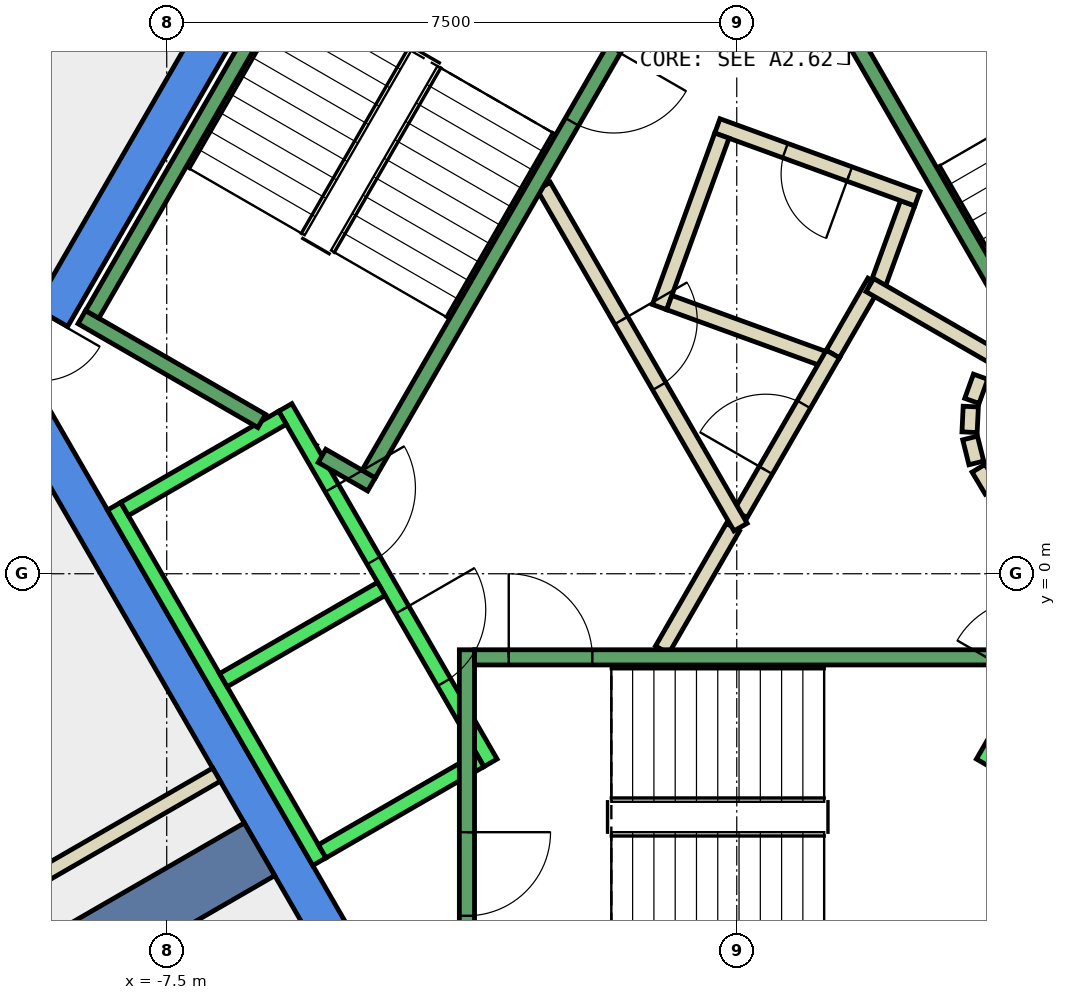
"""IFC4 building model, lengths in metres.
Left out: names, types, materials, properties, quantities, classifications, styles, units other than length and angle.
Written with IfcOpenShell. Run it as: python <this file> out.ifc"""

import sys

from ifc_helpers import new_model, si_unit, direction, frame, frame_2d, origin, place, context, subcontext, project, spatial, polyline, rectangle, outline, extrude, element, fill, save


model = new_model("IFC4")
c1 = context("Model", 3, precision=1e-05, world=origin(), true_north=direction((0.0, 1.0)))
c2 = subcontext(c1, "Body", "Model", "MODEL_VIEW")
j1 = project(units=[si_unit("LENGTHUNIT", "METRE"), si_unit("PLANEANGLEUNIT", "RADIAN")], contexts=[c1])
p1 = place(None, origin())
s1 = spatial("IfcSite", under=j1, at=p1, CompositionType="ELEMENT")
p2 = place(p1, origin())
s2 = spatial("IfcBuilding", under=s1, at=p2, CompositionType="ELEMENT")
p3 = place(p2, frame((0.0, 0.0, 290.0)))
s3 = spatial("IfcBuildingStorey", under=s2, at=p3, CompositionType="ELEMENT", Elevation=290.0)
p4 = place(p3, frame((0.0, 0.0, -0.34)))
e1 = element("IfcWall", 1, at=p4, inside=s3, PredefinedType="SHEAR", context=c2, shape_type="SweptSolid", body=[
    extrude(outline(polyline([(-9.236, 3.502), (-8.803, 3.253), (-4.619, 10.5), (-4.907, 11.0), (-9.236, 3.502)])), origin(), (0.0, 0.0, 1.0), 3.6),
])
p5 = place(p3, frame((0.0, 0.0, -0.34)))
e2 = element("IfcWall", 2, at=p5, inside=s3, PredefinedType="SHEAR", context=c2, shape_type="SweptSolid", body=[
    extrude(outline(polyline([(-9.815, 2.5), (-4.907, -6.0), (-4.619, -5.5), (-9.238, 2.5), (-9.815, 2.5)])), origin(), (0.0, 0.0, 1.0), 3.6),
])
p6 = place(p3, frame((-6.279, -3.625, -0.34), z_axis=(0.0, 0.0, 1.0), x_axis=(-0.866017533419, -0.500013631625, 0.0)))
e3 = element("IfcWall", 3, at=p6, inside=s3, PredefinedType="SHEAR", context=c2, shape_type="SweptSolid", body=[
    extrude(rectangle(XDim=9.0, YDim=0.8, at=frame_2d((4.5, 0.0))), origin(), (0.0, 0.0, 1.0), 3.6),
])
p7 = place(p3, frame((1.264, 2.89, 0.0), z_axis=(0.0, 0.0, 1.0), x_axis=(0.500043792738, 0.866000118559, 0.0)))
e4 = element("IfcWall", 4, at=p7, inside=s3, PredefinedType="PARTITIONING", context=c2, shape_type="SweptSolid", body=[
    extrude(rectangle(XDim=1.096, YDim=0.2, at=frame_2d((0.548, 0.0))), origin(), (0.0, 0.0, 1.0), 3.26),
])
p8 = place(p3, frame((1.838, 3.748, 0.0), z_axis=(0.0, 0.0, 1.0), x_axis=(0.342266462435, 0.939602931398, 0.0)))
e5 = element("IfcWall", 5, at=p8, inside=s3, PredefinedType="PARTITIONING", context=c2, shape_type="SweptSolid", body=[
    extrude(rectangle(XDim=1.198, YDim=0.2, at=frame_2d((0.599, 0.0))), origin(), (0.0, 0.0, 1.0), 3.26),
])
p9 = place(p3, frame((2.376, 4.934, 0.0), z_axis=(0.0, 0.0, 1.0), x_axis=(-0.939640574808, 0.342163104635, 0.0)))
e6 = element("IfcWall", 6, at=p9, inside=s3, PredefinedType="PARTITIONING", context=c2, shape_type="SweptSolid", body=[
    extrude(rectangle(XDim=2.8, YDim=0.2, at=frame_2d((1.4, 0.0))), origin(), (0.0, 0.0, 1.0), 3.26),
])
p10 = place(p9, frame((0.95, 0.0, 0.0)))
e7 = element("IfcOpeningElement", 7, at=p10, cuts=e6, PredefinedType="OPENING", context=c2, shape_type="SweptSolid", body=[
    extrude(rectangle(XDim=0.9, YDim=2.1, at=frame_2d((0.45, 1.05))), frame((0.0, 0.11, 0.0), z_axis=(0.0, -1.0, 0.0), x_axis=(1.0, 0.0, 0.0)), (0.0, 0.0, 1.0), 0.22),
])
p11 = place(p3, frame((-0.196, 5.764, 0.0), z_axis=(0.0, 0.0, 1.0), x_axis=(-0.34165322761, -0.939826086073, 0.0)))
e8 = element("IfcWall", 8, at=p11, inside=s3, PredefinedType="PARTITIONING", context=c2, shape_type="SweptSolid", body=[
    extrude(rectangle(XDim=2.4, YDim=0.2, at=frame_2d((1.2, 0.0))), origin(), (0.0, 0.0, 1.0), 3.26),
])
p12 = place(p3, frame((-0.888, 3.568, 0.0), z_axis=(0.0, 0.0, 1.0), x_axis=(0.939685034098, -0.34204098686, 0.0)))
e9 = element("IfcWall", 9, at=p12, inside=s3, PredefinedType="PARTITIONING", context=c2, shape_type="SweptSolid", body=[
    extrude(rectangle(XDim=2.237, YDim=0.2, at=frame_2d((1.119, 0.0))), origin(), (0.0, 0.0, 1.0), 3.26),
])
p13 = place(p3, frame((-0.982, -1.0, 0.0), z_axis=(0.0, 0.0, 1.0), x_axis=(0.50024047865, 0.865886518847, 0.0)))
e10 = element("IfcWall", 10, at=p13, inside=s3, PredefinedType="PARTITIONING", context=c2, shape_type="SweptSolid", body=[
    extrude(rectangle(XDim=1.863, YDim=0.2, at=frame_2d((0.931, 0.0))), origin(), (0.0, 0.0, 1.0), 3.26),
])
p14 = place(p3, frame((0.05, 0.787, 0.0), z_axis=(0.0, 0.0, 1.0), x_axis=(0.499945861543, 0.866056658381, 0.0)))
e11 = element("IfcWall", 11, at=p14, inside=s3, PredefinedType="PARTITIONING", context=c2, shape_type="SweptSolid", body=[
    extrude(rectangle(XDim=2.428, YDim=0.2, at=frame_2d((1.214, 0.0))), origin(), (0.0, 0.0, 1.0), 3.26),
])
p15 = place(p14, frame((0.664, 0.0, 0.0)))
e12 = element("IfcOpeningElement", 12, at=p15, cuts=e11, PredefinedType="OPENING", context=c2, shape_type="SweptSolid", body=[
    extrude(rectangle(XDim=1.0, YDim=2.1, at=frame_2d((0.5, 1.05))), frame((0.0, 0.11, 0.0), z_axis=(0.0, -1.0, 0.0), x_axis=(1.0, 0.0, 0.0)), (0.0, 0.0, 1.0), 0.22),
])
p16 = place(p3, frame((1.751, 3.798, 0.0), z_axis=(0.0, 0.0, 1.0), x_axis=(0.866091650241, -0.499885240213, 0.0)))
e13 = element("IfcWall", 13, at=p16, inside=s3, PredefinedType="PARTITIONING", context=c2, shape_type="SweptSolid", body=[
    extrude(rectangle(XDim=1.991, YDim=0.2, at=frame_2d((0.995, 0.0))), origin(), (0.0, 0.0, 1.0), 3.26),
])
p17 = place(p3, frame((3.208, 2.592, 0.0), z_axis=(0.0, 0.0, 1.0), x_axis=(-0.337388820924, -0.941365382578, 0.0)))
e14 = element("IfcWall", 14, at=p17, inside=s3, PredefinedType="PARTITIONING", context=c2, shape_type="SweptSolid", body=[
    extrude(rectangle(XDim=0.338, YDim=0.2, at=frame_2d((0.169, 0.0))), origin(), (0.0, 0.0, 1.0), 3.26),
])
p18 = place(p3, frame((3.079, 2.199, 0.0), z_axis=(0.0, 0.0, 1.0), x_axis=(-0.047771483479, -0.998858290933, 0.0)))
e15 = element("IfcWall", 15, at=p18, inside=s3, PredefinedType="PARTITIONING", context=c2, shape_type="SweptSolid", body=[
    extrude(rectangle(XDim=0.337, YDim=0.2, at=frame_2d((0.169, 0.0))), origin(), (0.0, 0.0, 1.0), 3.26),
])
p19 = place(p3, frame((3.07, 1.786, 0.0), z_axis=(0.0, 0.0, 1.0), x_axis=(0.242705583207, -0.970099994784, 0.0)))
e16 = element("IfcWall", 16, at=p19, inside=s3, PredefinedType="PARTITIONING", context=c2, shape_type="SweptSolid", body=[
    extrude(rectangle(XDim=0.338, YDim=0.2, at=frame_2d((0.169, 0.0))), origin(), (0.0, 0.0, 1.0), 3.26),
])
p20 = place(p3, frame((3.182, 1.388, 0.0), z_axis=(0.0, 0.0, 1.0), x_axis=(0.512474702713, -0.85870232274, 0.0)))
e17 = element("IfcWall", 17, at=p20, inside=s3, PredefinedType="PARTITIONING", context=c2, shape_type="SweptSolid", body=[
    extrude(rectangle(XDim=0.338, YDim=0.2, at=frame_2d((0.169, 0.0))), origin(), (0.0, 0.0, 1.0), 3.26),
])
p21 = place(p3, frame((-2.54, 5.1, 0.0), z_axis=(0.0, 0.0, 1.0), x_axis=(0.499925051871, -0.866068670783, 0.0)))
e18 = element("IfcWall", 18, at=p21, inside=s3, PredefinedType="PARTITIONING", context=c2, shape_type="SweptSolid", body=[
    extrude(rectangle(XDim=5.181, YDim=0.2, at=frame_2d((2.59, 0.0))), origin(), (0.0, 0.0, 1.0), 3.26),
])
p22 = place(p21, frame((2.04, 0.0, 0.0)))
e19 = element("IfcOpeningElement", 19, at=p22, cuts=e18, PredefinedType="OPENING", context=c2, shape_type="SweptSolid", body=[
    extrude(rectangle(XDim=1.0, YDim=2.1, at=frame_2d((0.5, 1.05))), frame((0.0, 0.11, 0.0), z_axis=(0.0, -1.0, 0.0), x_axis=(1.0, 0.0, 0.0)), (0.0, 0.0, 1.0), 0.22),
])
p23 = place(p3, frame((-6.845, -2.643, 0.0), z_axis=(0.0, 0.0, 1.0), x_axis=(-0.865994457699, -0.500053596362, 0.0)))
e20 = element("IfcWall", 20, at=p23, inside=s3, PredefinedType="PARTITIONING", context=c2, shape_type="SweptSolid", body=[
    extrude(rectangle(XDim=6.701, YDim=0.2, at=frame_2d((3.351, 0.0))), origin(), (0.0, 0.0, 1.0), 3.26),
])
p24 = place(p3, frame((-5.94, 2.188, 0.0), z_axis=(0.0, 0.0, 1.0), x_axis=(0.500034260056, -0.866005622828, 0.0)))
e21 = element("IfcWall", 21, at=p24, inside=s3, PredefinedType="STANDARD", context=c2, shape_type="SweptSolid", body=[
    extrude(rectangle(XDim=5.399, YDim=0.2, at=frame_2d((2.7, 0.0))), origin(), (0.0, 0.0, 1.0), 3.26),
])
p25 = place(p24, frame((3.075, 0.0, 0.0)))
e22 = element("IfcOpeningElement", 22, at=p25, cuts=e21, PredefinedType="OPENING", context=c2, shape_type="SweptSolid", body=[
    extrude(rectangle(XDim=1.1, YDim=2.1, at=frame_2d((0.55, 1.05))), frame((0.0, 0.11, 0.0), z_axis=(0.0, -1.0, 0.0), x_axis=(1.0, 0.0, 0.0)), (0.0, 0.0, 1.0), 0.22),
])
p26 = place(p24, frame((1.225, 0.0, 0.0)))
e23 = element("IfcOpeningElement", 23, at=p26, cuts=e21, PredefinedType="OPENING", context=c2, shape_type="SweptSolid", body=[
    extrude(rectangle(XDim=1.1, YDim=2.1, at=frame_2d((0.55, 1.05))), frame((0.0, 0.11, 0.0), z_axis=(0.0, -1.0, 0.0), x_axis=(1.0, 0.0, 0.0)), (0.0, 0.0, 1.0), 0.22),
])
p27 = place(p3, frame((-8.192, 0.888, 0.0), z_axis=(0.0, 0.0, 1.0), x_axis=(0.500034260056, -0.866005622828, 0.0)))
e24 = element("IfcWall", 24, at=p27, inside=s3, PredefinedType="STANDARD", context=c2, shape_type="SweptSolid", body=[
    extrude(rectangle(XDim=5.399, YDim=0.2, at=frame_2d((2.7, 0.0))), origin(), (0.0, 0.0, 1.0), 3.26),
])
for number, where, z_axis, x_axis in (
    (25, (-5.977, 2.052, 0.0), (0.0, 0.0, 1.0), (-0.866, -0.5, 0.0)),
    (26, (-4.677, -0.2, 0.0), (0.0, 0.0, 1.0), (-0.866, -0.5, 0.0)),
):
    element("IfcWall", number, at=place(p3, frame(where, z_axis=z_axis, x_axis=x_axis)), inside=s3, PredefinedType="STANDARD", context=c2, shape_type="SweptSolid", body=[
        extrude(rectangle(XDim=2.399, YDim=0.2, at=frame_2d((1.2, 0.0))), origin(), (0.0, 0.0, 1.0), 3.26),
    ])
p28 = place(p3, frame((-3.377, -2.452, 0.0), z_axis=(0.0, 0.0, 1.0), x_axis=(-0.865955154139, -0.50012165622, 0.0)))
e27 = element("IfcWall", 27, at=p28, inside=s3, PredefinedType="STANDARD", context=c2, shape_type="SweptSolid", body=[
    extrude(rectangle(XDim=2.4, YDim=0.2, at=frame_2d((1.2, 0.0))), origin(), (0.0, 0.0, 1.0), 3.26),
])
p29 = place(p3, frame((3.24, -2.488, 0.0), z_axis=(0.0, 0.0, 1.0), x_axis=(0.500034260056, 0.866005622828, 0.0)))
e28 = element("IfcWall", 28, at=p29, inside=s3, PredefinedType="STANDARD", context=c2, shape_type="SweptSolid", body=[
    extrude(rectangle(XDim=5.399, YDim=0.2, at=frame_2d((2.7, 0.0))), origin(), (0.0, 0.0, 1.0), 3.26),
])
p30 = place(p29, frame((3.225, 0.0, 0.0)))
e29 = element("IfcOpeningElement", 29, at=p30, cuts=e28, PredefinedType="OPENING", context=c2, shape_type="SweptSolid", body=[
    extrude(rectangle(XDim=1.1, YDim=2.1, at=frame_2d((0.55, 1.05))), frame((0.0, 0.11, 0.0), z_axis=(0.0, -1.0, 0.0), x_axis=(1.0, 0.0, 0.0)), (0.0, 0.0, 1.0), 0.22),
])
p31 = place(p29, frame((1.225, 0.0, 0.0)))
e30 = element("IfcOpeningElement", 30, at=p31, cuts=e28, PredefinedType="OPENING", context=c2, shape_type="SweptSolid", body=[
    extrude(rectangle(XDim=1.1, YDim=2.1, at=frame_2d((0.55, 1.05))), frame((0.0, 0.11, 0.0), z_axis=(0.0, -1.0, 0.0), x_axis=(1.0, 0.0, 0.0)), (0.0, 0.0, 1.0), 0.22),
])
p32 = place(p3, frame((-3.55, -1.0, 0.0), z_axis=(0.0, 0.0, 1.0), x_axis=(0.0, -1.0, 0.0)))
e31 = element("IfcWall", 31, at=p32, inside=s3, PredefinedType="STANDARD", context=c2, shape_type="SweptSolid", body=[
    extrude(rectangle(XDim=4.4, YDim=0.2, at=frame_2d((2.2, 0.0))), origin(), (0.0, 0.0, 1.0), 3.26),
])
p33 = place(p32, frame((2.4, 0.0, 0.0)))
e32 = element("IfcOpeningElement", 32, at=p33, cuts=e31, PredefinedType="OPENING", context=c2, shape_type="SweptSolid", body=[
    extrude(rectangle(XDim=1.1, YDim=2.2, at=frame_2d((0.55, 1.1))), frame((0.0, 0.11, 0.0), z_axis=(0.0, -1.0, 0.0), x_axis=(1.0, 0.0, 0.0)), (0.0, 0.0, 1.0), 0.22),
])
p34 = place(p3, frame((-3.45, -1.1, 0.0), z_axis=(0.0, 0.0, 1.0), x_axis=(1.0, 0.0, 0.0)))
e33 = element("IfcWall", 33, at=p34, inside=s3, PredefinedType="STANDARD", context=c2, shape_type="SweptSolid", body=[
    extrude(rectangle(XDim=6.9, YDim=0.2, at=frame_2d((3.45, 0.0))), origin(), (0.0, 0.0, 1.0), 3.26),
])
p35 = place(p34, frame((0.45, 0.0, 0.0)))
e34 = element("IfcOpeningElement", 34, at=p35, cuts=e33, PredefinedType="OPENING", context=c2, shape_type="SweptSolid", body=[
    extrude(rectangle(XDim=1.1, YDim=2.2, at=frame_2d((0.55, 1.1))), frame((0.0, 0.11, 0.0), z_axis=(0.0, -1.0, 0.0), x_axis=(1.0, 0.0, 0.0)), (0.0, 0.0, 1.0), 0.22),
])
p36 = place(p3, frame((4.843, 1.312, 0.0), z_axis=(0.0, 0.0, 1.0), x_axis=(-0.499963383562, 0.866046543262, 0.0)))
e35 = element("IfcWall", 35, at=p36, inside=s3, PredefinedType="STANDARD", context=c2, shape_type="SweptSolid", body=[
    extrude(rectangle(XDim=6.9, YDim=0.2, at=frame_2d((3.45, 0.0))), origin(), (0.0, 0.0, 1.0), 3.26),
])
p37 = place(p36, frame((0.45, 0.0, 0.0)))
e36 = element("IfcOpeningElement", 36, at=p37, cuts=e35, PredefinedType="OPENING", context=c2, shape_type="SweptSolid", body=[
    extrude(rectangle(XDim=1.1, YDim=2.2, at=frame_2d((0.55, 1.1))), frame((0.0, 0.11, 0.0), z_axis=(0.0, -1.0, 0.0), x_axis=(1.0, 0.0, 0.0)), (0.0, 0.0, 1.0), 0.22),
])
p38 = place(p3, frame((-6.25, 2.01, 0.0), z_axis=(0.0, 0.0, 1.0), x_axis=(-0.86611865017, 0.499838457731, 0.0)))
e37 = element("IfcWall", 37, at=p38, inside=s3, PredefinedType="STANDARD", context=c2, shape_type="SweptSolid", body=[
    extrude(rectangle(XDim=2.733, YDim=0.2, at=frame_2d((1.366, 0.0))), origin(), (0.0, 0.0, 1.0), 3.26),
])
p39 = place(p3, frame((-4.806, 1.176, 0.0), z_axis=(0.0, 0.0, 1.0), x_axis=(-0.866558586415, 0.499075361355, 0.0)))
e38 = element("IfcWall", 38, at=p39, inside=s3, PredefinedType="STANDARD", context=c2, shape_type="SweptSolid", body=[
    extrude(rectangle(XDim=0.751, YDim=0.2, at=frame_2d((0.376, 0.0))), origin(), (0.0, 0.0, 1.0), 3.26),
])
p40 = place(p3, frame((-1.393, 7.288, 0.0), z_axis=(0.0, 0.0, 1.0), x_axis=(-0.499963383562, -0.866046543262, 0.0)))
e39 = element("IfcWall", 39, at=p40, inside=s3, PredefinedType="STANDARD", context=c2, shape_type="SweptSolid", body=[
    extrude(rectangle(XDim=6.9, YDim=0.2, at=frame_2d((3.45, 0.0))), origin(), (0.0, 0.0, 1.0), 3.26),
])
p41 = place(p40, frame((0.45, 0.0, 0.0)))
e40 = element("IfcOpeningElement", 40, at=p41, cuts=e39, PredefinedType="OPENING", context=c2, shape_type="SweptSolid", body=[
    extrude(rectangle(XDim=1.1, YDim=2.2, at=frame_2d((0.55, 1.1))), frame((0.0, 0.11, 0.0), z_axis=(0.0, -1.0, 0.0), x_axis=(1.0, 0.0, 0.0)), (0.0, 0.0, 1.0), 0.22),
])
p42 = place(p3, frame((-5.03, 9.388, 0.0), z_axis=(0.0, 0.0, 1.0), x_axis=(-0.499978703459, -0.866037698999, 0.0)))
e41 = element("IfcWall", 41, at=p42, inside=s3, PredefinedType="STANDARD", context=c2, shape_type="SweptSolid", body=[
    extrude(rectangle(XDim=6.9, YDim=0.2, at=frame_2d((3.45, 0.0))), origin(), (0.0, 0.0, 1.0), 3.26),
])
p43 = place(p15, origin())
e42 = element("IfcDoor", 42, at=p43, inside=s3, OperationType="SINGLE_SWING_RIGHT", PredefinedType="DOOR", context=c2, shape_type="SweptSolid", body=[
    extrude(rectangle(XDim=1.0, YDim=2.1, at=frame_2d((0.5, 1.05))), frame((0.0, 0.025, 0.0), z_axis=(0.0, -1.0, 0.0), x_axis=(1.0, 0.0, 0.0)), (0.0, 0.0, 1.0), 0.05),
])
fill(e12, e42)
p44 = place(p22, origin())
e43 = element("IfcDoor", 43, at=p44, inside=s3, OperationType="SINGLE_SWING_RIGHT", PredefinedType="DOOR", context=c2, shape_type="SweptSolid", body=[
    extrude(rectangle(XDim=1.0, YDim=2.1, at=frame_2d((0.5, 1.05))), frame((0.0, 0.025, 0.0), z_axis=(0.0, -1.0, 0.0), x_axis=(1.0, 0.0, 0.0)), (0.0, 0.0, 1.0), 0.05),
])
fill(e19, e43)
p45 = place(p10, origin())
e44 = element("IfcDoor", 44, at=p45, inside=s3, OperationType="SINGLE_SWING_LEFT", PredefinedType="DOOR", context=c2, shape_type="SweptSolid", body=[
    extrude(rectangle(XDim=0.9, YDim=2.1, at=frame_2d((0.45, 1.05))), frame((0.0, 0.025, 0.0), z_axis=(0.0, -1.0, 0.0), x_axis=(1.0, 0.0, 0.0)), (0.0, 0.0, 1.0), 0.05),
])
fill(e7, e44)
p46 = place(p25, origin())
e45 = element("IfcDoor", 45, at=p46, inside=s3, OperationType="SLIDING_TO_LEFT", PredefinedType="DOOR", context=c2, shape_type="SweptSolid", body=[
    extrude(rectangle(XDim=1.1, YDim=2.1, at=frame_2d((0.55, 1.05))), frame((0.0, 0.025, 0.0), z_axis=(0.0, -1.0, 0.0), x_axis=(1.0, 0.0, 0.0)), (0.0, 0.0, 1.0), 0.05),
])
fill(e22, e45)
p47 = place(p26, origin())
e46 = element("IfcDoor", 46, at=p47, inside=s3, OperationType="SLIDING_TO_LEFT", PredefinedType="DOOR", context=c2, shape_type="SweptSolid", body=[
    extrude(rectangle(XDim=1.1, YDim=2.1, at=frame_2d((0.55, 1.05))), frame((0.0, 0.025, 0.0), z_axis=(0.0, -1.0, 0.0), x_axis=(1.0, 0.0, 0.0)), (0.0, 0.0, 1.0), 0.05),
])
fill(e23, e46)
p48 = place(p35, origin())
e47 = element("IfcDoor", 47, at=p48, inside=s3, OperationType="SINGLE_SWING_LEFT", PredefinedType="DOOR", context=c2, shape_type="SweptSolid", body=[
    extrude(rectangle(XDim=1.1, YDim=2.2, at=frame_2d((0.55, 1.1))), frame((0.0, 0.025, 0.0), z_axis=(0.0, -1.0, 0.0), x_axis=(1.0, 0.0, 0.0)), (0.0, 0.0, 1.0), 0.05),
])
fill(e34, e47)
p49 = place(p33, origin())
e48 = element("IfcDoor", 48, at=p49, inside=s3, OperationType="SINGLE_SWING_LEFT", PredefinedType="DOOR", context=c2, shape_type="SweptSolid", body=[
    extrude(rectangle(XDim=1.1, YDim=2.2, at=frame_2d((0.55, 1.1))), frame((0.0, 0.025, 0.0), z_axis=(0.0, -1.0, 0.0), x_axis=(1.0, 0.0, 0.0)), (0.0, 0.0, 1.0), 0.05),
])
fill(e32, e48)
p50 = place(p41, origin())
e49 = element("IfcDoor", 49, at=p50, inside=s3, OperationType="SINGLE_SWING_LEFT", PredefinedType="DOOR", context=c2, shape_type="SweptSolid", body=[
    extrude(rectangle(XDim=1.1, YDim=2.2, at=frame_2d((0.55, 1.1))), frame((0.0, 0.025, 0.0), z_axis=(0.0, -1.0, 0.0), x_axis=(1.0, 0.0, 0.0)), (0.0, 0.0, 1.0), 0.05),
])
fill(e40, e49)
save(model, sys.argv[1])
